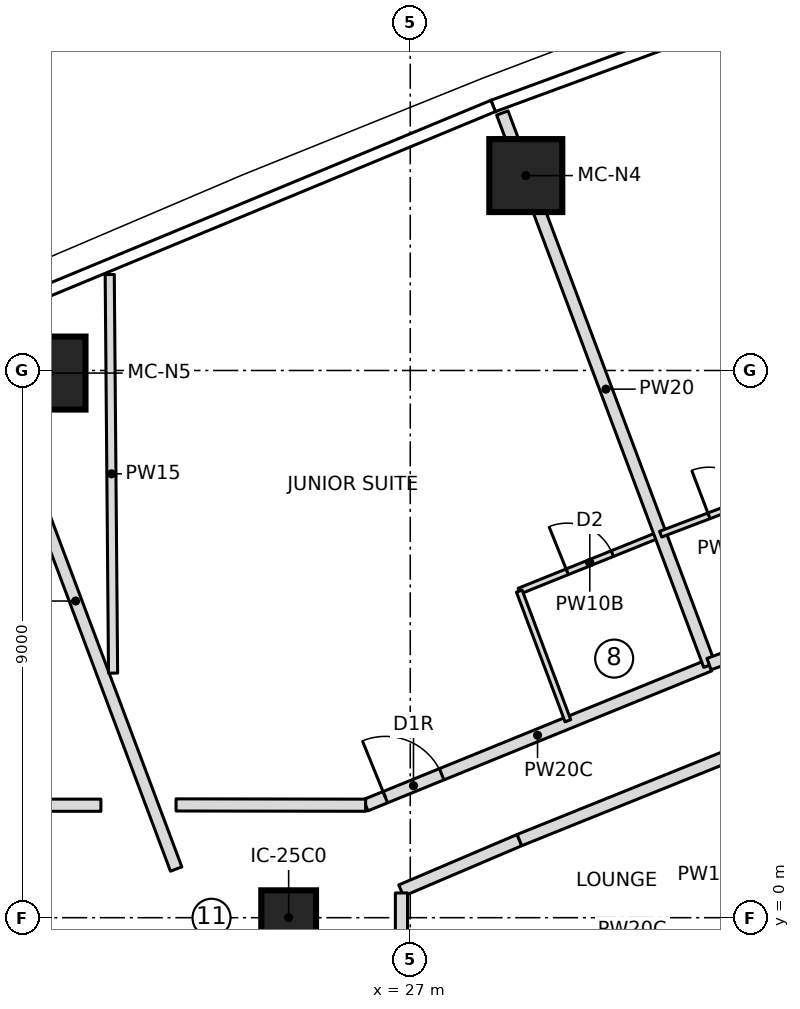
"""IFC4 building model, lengths in metres.
Left out: names, types, materials, properties, quantities, classifications, styles, units other than length and angle.
Written with IfcOpenShell. Run it as: python <this file> out.ifc"""

import sys

from ifc_helpers import new_model, si_unit, direction, frame, frame_2d, origin, origin_2d, place, context, subcontext, project, spatial, rectangle, extrude, element, fill, save


model = new_model("IFC4")
c1 = context("Model", 3, precision=1e-05, world=origin(), true_north=direction((0.0, 1.0)))
c2 = subcontext(c1, "Body", "Model", "MODEL_VIEW")
j1 = project(units=[si_unit("LENGTHUNIT", "METRE"), si_unit("PLANEANGLEUNIT", "RADIAN")], contexts=[c1])
p1 = place(None, origin())
s1 = spatial("IfcSite", under=j1, at=p1, CompositionType="ELEMENT")
p2 = place(p1, origin())
s2 = spatial("IfcBuilding", under=s1, at=p2, CompositionType="ELEMENT")
p3 = place(p2, frame((0.0, 0.0, 224.35)))
s3 = spatial("IfcBuildingStorey", under=s2, at=p3, CompositionType="ELEMENT", Elevation=224.35)
for number, where, z_axis, x_axis in (
    (1, (28.9, 12.205, 0.0), (0.0, 0.0, 1.0), (1.0, 0.0, 0.0)),
    (2, (21.059, 8.958, 0.0), (0.0, 0.0, 1.0), (1.0, 0.0, 0.0)),
):
    element("IfcColumn", number, at=place(p3, frame(where, z_axis=z_axis, x_axis=x_axis)), inside=s3, PredefinedType="COLUMN", context=c2, shape_type="SweptSolid", body=[
        extrude(rectangle(XDim=1.2, YDim=1.2, at=origin_2d()), origin(), (0.0, 0.0, 1.0), 3.55),
    ])
p4 = place(p3, frame((25.0, 0.0, 0.0), z_axis=(0.0, 0.0, 1.0), x_axis=(1.0, 0.0, 0.0)))
e3 = element("IfcColumn", 3, at=p4, inside=s3, PredefinedType="COLUMN", context=c2, shape_type="SweptSolid", body=[
    extrude(rectangle(XDim=0.9, YDim=0.9, at=origin_2d()), origin(), (0.0, 0.0, 1.0), 3.55),
])
p5 = place(p3, frame((6.725, 1.85, 0.0), z_axis=(0.0, 0.0, 1.0), x_axis=(1.0, 0.0, 0.0)))
e4 = element("IfcWall", 4, at=p5, inside=s3, PredefinedType="PARTITIONING", context=c2, shape_type="SweptSolid", body=[
    extrude(rectangle(XDim=15.188, YDim=0.2, at=frame_2d((7.594, 0.0))), origin(), (0.0, 0.0, 1.0), 3.25),
])
p6 = place(p5, frame((7.257, 0.0, 0.0)))
e5 = element("IfcOpeningElement", 5, at=p6, cuts=e4, PredefinedType="OPENING", context=c2, shape_type="SweptSolid", body=[
    extrude(rectangle(XDim=1.0, YDim=2.1, at=frame_2d((0.5, 1.05))), frame((0.0, 0.11, 0.0), z_axis=(0.0, -1.0, 0.0), x_axis=(1.0, 0.0, 0.0)), (0.0, 0.0, 1.0), 0.22),
])
p7 = place(p3, frame((23.15, 0.8, 0.0), z_axis=(0.0, 0.0, 1.0), x_axis=(-0.351123441588, 0.936329177569, 0.0)))
e6 = element("IfcWall", 6, at=p7, inside=s3, PredefinedType="PARTITIONING", context=c2, shape_type="SweptSolid", body=[
    extrude(rectangle(XDim=9.416, YDim=0.2, at=frame_2d((4.708, 0.0))), origin(), (0.0, 0.0, 1.0), 3.25),
])
p8 = place(p3, frame((26.266, 1.85, 0.0), z_axis=(0.0, 0.0, 1.0), x_axis=(0.926231512449, 0.376955150311, 0.0)))
e7 = element("IfcWall", 7, at=p8, inside=s3, PredefinedType="PARTITIONING", context=c2, shape_type="SweptSolid", body=[
    extrude(rectangle(XDim=6.105, YDim=0.2, at=frame_2d((3.052, 0.0))), origin(), (0.0, 0.0, 1.0), 3.25),
])
p9 = place(p8, frame((0.35, 0.0, 0.0)))
e8 = element("IfcOpeningElement", 8, at=p9, cuts=e7, PredefinedType="OPENING", context=c2, shape_type="SweptSolid", body=[
    extrude(rectangle(XDim=1.0, YDim=2.1, at=frame_2d((0.5, 1.05))), frame((0.0, 0.11, 0.0), z_axis=(0.0, -1.0, 0.0), x_axis=(1.0, 0.0, 0.0)), (0.0, 0.0, 1.0), 0.22),
])
p10 = place(p3, frame((28.793, 5.372, 0.0), z_axis=(0.0, 0.0, 1.0), x_axis=(0.92761232595, 0.373544338394, 0.0)))
e9 = element("IfcWall", 9, at=p10, inside=s3, PredefinedType="PARTITIONING", context=c2, shape_type="SweptSolid", body=[
    extrude(rectangle(XDim=2.5, YDim=0.1, at=frame_2d((1.25, 0.0))), origin(), (0.0, 0.0, 1.0), 3.25),
])
p11 = place(p10, frame((0.85, 0.0, 0.0)))
e10 = element("IfcOpeningElement", 10, at=p11, cuts=e9, PredefinedType="OPENING", context=c2, shape_type="SweptSolid", body=[
    extrude(rectangle(XDim=0.8, YDim=2.1, at=frame_2d((0.4, 1.05))), frame((0.0, 0.06, 0.0), z_axis=(0.0, -1.0, 0.0), x_axis=(1.0, 0.0, 0.0)), (0.0, 0.0, 1.0), 0.12),
])
p12 = place(p3, frame((29.593, 3.239, 0.0), z_axis=(0.0, 0.0, 1.0), x_axis=(-0.351158682313, 0.936315961541, 0.0)))
e11 = element("IfcWall", 11, at=p12, inside=s3, PredefinedType="PARTITIONING", context=c2, shape_type="SweptSolid", body=[
    extrude(rectangle(XDim=2.278, YDim=0.1, at=frame_2d((1.139, 0.0))), origin(), (0.0, 0.0, 1.0), 3.25),
])
p13 = place(p3, frame((31.92, 4.151, 0.0), z_axis=(0.0, 0.0, 1.0), x_axis=(-0.351126199585, 0.936328143316, 0.0)))
e12 = element("IfcWall", 12, at=p13, inside=s3, PredefinedType="PARTITIONING", context=c2, shape_type="SweptSolid", body=[
    extrude(rectangle(XDim=9.701, YDim=0.2, at=frame_2d((4.851, 0.0))), origin(), (0.0, 0.0, 1.0), 3.25),
])
p14 = place(p3, frame((39.882, 7.091, 0.0), z_axis=(0.0, 0.0, 1.0), x_axis=(-0.938916907106, -0.344143925634, 0.0)))
e13 = element("IfcWall", 13, at=p14, inside=s3, PredefinedType="PARTITIONING", context=c2, shape_type="SweptSolid", body=[
    extrude(rectangle(XDim=8.488, YDim=0.2, at=frame_2d((4.244, 0.0))), origin(), (0.0, 0.0, 1.0), 3.25),
])
p15 = place(p14, frame((0.35, 0.0, 0.0)))
e14 = element("IfcOpeningElement", 14, at=p15, cuts=e13, PredefinedType="OPENING", context=c2, shape_type="SweptSolid", body=[
    extrude(rectangle(XDim=1.0, YDim=2.1, at=frame_2d((0.5, 1.05))), frame((0.0, 0.11, 0.0), z_axis=(0.0, -1.0, 0.0), x_axis=(1.0, 0.0, 0.0)), (0.0, 0.0, 1.0), 0.22),
])
p16 = place(p3, frame((31.117, 6.308, 0.0), z_axis=(0.0, 0.0, 1.0), x_axis=(0.93495051617, 0.354778145202, 0.0)))
e15 = element("IfcWall", 15, at=p16, inside=s3, PredefinedType="PARTITIONING", context=c2, shape_type="SweptSolid", body=[
    extrude(rectangle(XDim=2.495, YDim=0.1, at=frame_2d((1.247, 0.0))), origin(), (0.0, 0.0, 1.0), 3.25),
])
p17 = place(p16, frame((0.85, 0.0, 0.0)))
e16 = element("IfcOpeningElement", 16, at=p17, cuts=e15, PredefinedType="OPENING", context=c2, shape_type="SweptSolid", body=[
    extrude(rectangle(XDim=0.8, YDim=2.1, at=frame_2d((0.4, 1.05))), frame((0.0, 0.06, 0.0), z_axis=(0.0, -1.0, 0.0), x_axis=(1.0, 0.0, 0.0)), (0.0, 0.0, 1.0), 0.12),
])
p18 = place(p3, frame((26.85, 0.447, 0.0), z_axis=(0.0, 0.0, 1.0), x_axis=(0.91990756443, 0.392135273732, 0.0)))
e17 = element("IfcWall", 17, at=p18, inside=s3, PredefinedType="PARTITIONING", context=c2, shape_type="SweptSolid", body=[
    extrude(rectangle(XDim=2.115, YDim=0.2, at=frame_2d((1.058, 0.0))), origin(), (0.0, 0.0, 1.0), 3.25),
])
p19 = place(p3, frame((28.796, 1.276, 0.0), z_axis=(0.0, 0.0, 1.0), x_axis=(0.927622894464, 0.373518092823, 0.0)))
e18 = element("IfcWall", 18, at=p19, inside=s3, PredefinedType="PARTITIONING", context=c2, shape_type="SweptSolid", body=[
    extrude(rectangle(XDim=3.995, YDim=0.2, at=frame_2d((1.998, 0.0))), origin(), (0.0, 0.0, 1.0), 3.25),
])
p20 = place(p3, frame((22.057, 10.578, 0.0), z_axis=(0.0, 0.0, 1.0), x_axis=(0.008379594055, -0.999964890585, 0.0)))
e19 = element("IfcWall", 19, at=p20, inside=s3, PredefinedType="PARTITIONING", context=c2, shape_type="SweptSolid", body=[
    extrude(rectangle(XDim=6.555, YDim=0.15, at=frame_2d((3.278, 0.0))), origin(), (0.0, 0.0, 1.0), 3.25),
])
p21 = place(p3, frame((26.855, -0.407, 0.0), z_axis=(0.0, 0.0, 1.0), x_axis=(0.0, 1.0, 0.0)))
e20 = element("IfcWall", 20, at=p21, inside=s3, PredefinedType="PARTITIONING", context=c2, shape_type="SweptSolid", body=[
    extrude(rectangle(XDim=0.814, YDim=0.2, at=frame_2d((0.407, 0.0))), origin(), (0.0, 0.0, 1.0), 3.25),
])
p22 = place(p3, frame((26.266, 1.85, 0.0), z_axis=(0.0, 0.0, 1.0), x_axis=(-0.999999006581, 0.001409552241, 0.0)))
e21 = element("IfcWall", 21, at=p22, inside=s3, PredefinedType="PARTITIONING", context=c2, shape_type="SweptSolid", body=[
    extrude(rectangle(XDim=3.118, YDim=0.2, at=frame_2d((1.559, 0.0))), origin(), (0.0, 0.0, 1.0), 3.25),
])
p23 = place(p11, origin())
e22 = element("IfcDoor", 22, at=p23, inside=s3, OperationType="SINGLE_SWING_LEFT", PredefinedType="DOOR", context=c2, shape_type="SweptSolid", body=[
    extrude(rectangle(XDim=0.8, YDim=2.1, at=frame_2d((0.4, 1.05))), frame((0.0, 0.025, 0.0), z_axis=(0.0, -1.0, 0.0), x_axis=(1.0, 0.0, 0.0)), (0.0, 0.0, 1.0), 0.05),
])
fill(e10, e22)
p24 = place(p9, origin())
e23 = element("IfcDoor", 23, at=p24, inside=s3, OperationType="SINGLE_SWING_RIGHT", PredefinedType="DOOR", context=c2, shape_type="SweptSolid", body=[
    extrude(rectangle(XDim=1.0, YDim=2.1, at=frame_2d((0.5, 1.05))), frame((0.0, 0.025, 0.0), z_axis=(0.0, -1.0, 0.0), x_axis=(1.0, 0.0, 0.0)), (0.0, 0.0, 1.0), 0.05),
])
fill(e8, e23)
p25 = place(p17, origin())
e24 = element("IfcDoor", 24, at=p25, inside=s3, OperationType="SINGLE_SWING_LEFT", PredefinedType="DOOR", context=c2, shape_type="SweptSolid", body=[
    extrude(rectangle(XDim=0.8, YDim=2.1, at=frame_2d((0.4, 1.05))), frame((0.0, 0.025, 0.0), z_axis=(0.0, -1.0, 0.0), x_axis=(1.0, 0.0, 0.0)), (0.0, 0.0, 1.0), 0.05),
])
fill(e16, e24)
save(model, sys.argv[1])
